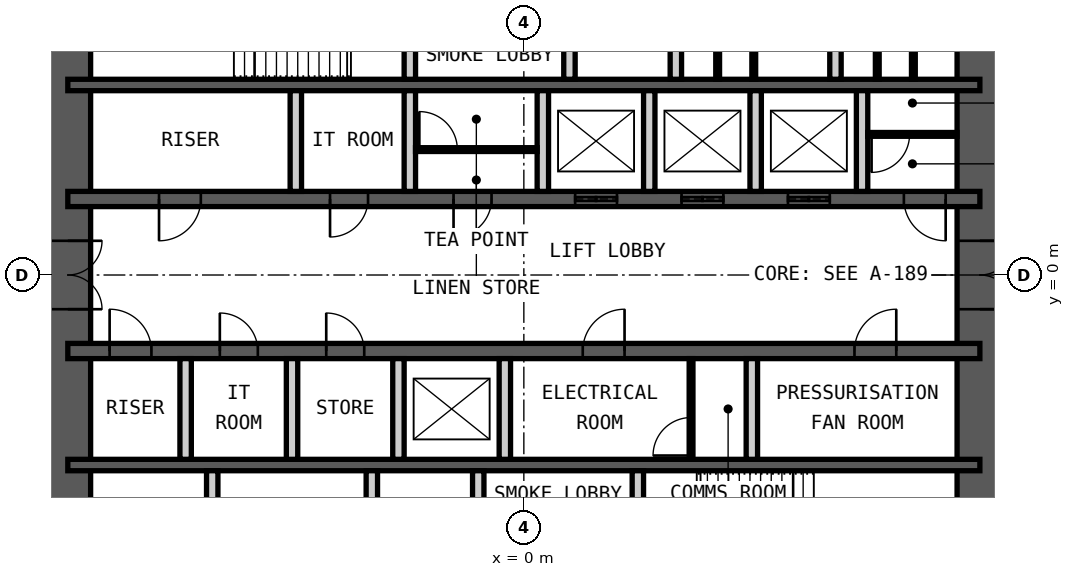
"""IFC4 building model, lengths in metres.
Left out: names, types, materials, properties, quantities, classifications, styles, units other than length and angle.
Written with IfcOpenShell. Run it as: python <this file> out.ifc"""

import sys

from ifc_helpers import new_model, si_unit, direction, frame, frame_2d, origin, place, context, subcontext, project, spatial, rectangle, extrude, element, fill, save


model = new_model("IFC4")
c1 = context("Model", 3, precision=1e-05, world=origin(), true_north=direction((0.0, 1.0)))
c2 = subcontext(c1, "Body", "Model", "MODEL_VIEW")
j1 = project(units=[si_unit("LENGTHUNIT", "METRE"), si_unit("PLANEANGLEUNIT", "RADIAN")], contexts=[c1])
p1 = place(None, origin())
s1 = spatial("IfcSite", under=j1, at=p1, CompositionType="ELEMENT")
p2 = place(p1, origin())
s2 = spatial("IfcBuilding", under=s1, at=p2, CompositionType="ELEMENT")
p3 = place(p2, frame((0.0, 0.0, 201.4)))
s3 = spatial("IfcBuildingStorey", under=s2, at=p3, CompositionType="ELEMENT", Elevation=201.4)
p4 = place(p3, frame((12.0, -9.0, 0.0), z_axis=(0.0, 0.0, 1.0), x_axis=(0.0, 1.0, 0.0)))
e1 = element("IfcWall", 1, at=p4, inside=s3, PredefinedType="SHEAR", context=c2, shape_type="SweptSolid", body=[
    extrude(rectangle(XDim=18.0, YDim=1.2, at=frame_2d((9.0, 0.0))), origin(), (0.0, 0.0, 1.0), 4.2),
])
p5 = place(p4, frame((8.1, 0.0, 0.0)))
e2 = element("IfcOpeningElement", 2, at=p5, cuts=e1, PredefinedType="OPENING", context=c2, shape_type="SweptSolid", body=[
    extrude(rectangle(XDim=1.8, YDim=2.1, at=frame_2d((0.9, 1.05))), frame((0.0, 0.61, 0.0), z_axis=(0.0, -1.0, 0.0), x_axis=(1.0, 0.0, 0.0)), (0.0, 0.0, 1.0), 1.22),
])
p6 = place(p3, frame((-12.0, -9.0, 0.0), z_axis=(0.0, 0.0, 1.0), x_axis=(0.0, 1.0, 0.0)))
e3 = element("IfcWall", 3, at=p6, inside=s3, PredefinedType="SHEAR", context=c2, shape_type="SweptSolid", body=[
    extrude(rectangle(XDim=18.0, YDim=1.2, at=frame_2d((9.0, 0.0))), origin(), (0.0, 0.0, 1.0), 4.2),
])
p7 = place(p6, frame((8.1, 0.0, 0.0)))
e4 = element("IfcOpeningElement", 4, at=p7, cuts=e3, PredefinedType="OPENING", context=c2, shape_type="SweptSolid", body=[
    extrude(rectangle(XDim=1.8, YDim=2.1, at=frame_2d((0.9, 1.05))), frame((0.0, 0.61, 0.0), z_axis=(0.0, -1.0, 0.0), x_axis=(1.0, 0.0, 0.0)), (0.0, 0.0, 1.0), 1.22),
])
p8 = place(p3, frame((-12.0, 5.0, 0.0), z_axis=(0.0, 0.0, 1.0), x_axis=(1.0, 0.0, 0.0)))
e5 = element("IfcWall", 5, at=p8, inside=s3, PredefinedType="SHEAR", context=c2, shape_type="SweptSolid", body=[
    extrude(rectangle(XDim=24.0, YDim=0.3, at=frame_2d((12.0, 0.0))), origin(), (0.0, 0.0, 1.0), 4.2),
])
p9 = place(p3, frame((-12.0, 2.0, 0.0), z_axis=(0.0, 0.0, 1.0), x_axis=(1.0, 0.0, 0.0)))
e6 = element("IfcWall", 6, at=p9, inside=s3, PredefinedType="SHEAR", context=c2, shape_type="SweptSolid", body=[
    extrude(rectangle(XDim=24.0, YDim=0.4, at=frame_2d((12.0, 0.0))), origin(), (0.0, 0.0, 1.0), 4.2),
])
p10 = place(p9, frame((2.4, 0.0, 0.0)))
e7 = element("IfcOpeningElement", 7, at=p10, cuts=e6, PredefinedType="OPENING", context=c2, shape_type="SweptSolid", body=[
    extrude(rectangle(XDim=1.1, YDim=2.1, at=frame_2d((0.55, 1.05))), frame((0.0, 0.21, 0.0), z_axis=(0.0, -1.0, 0.0), x_axis=(1.0, 0.0, 0.0)), (0.0, 0.0, 1.0), 0.42),
])
p11 = place(p9, frame((22.0, 0.0, 0.0)))
e8 = element("IfcOpeningElement", 8, at=p11, cuts=e6, PredefinedType="OPENING", context=c2, shape_type="SweptSolid", body=[
    extrude(rectangle(XDim=1.1, YDim=2.1, at=frame_2d((0.55, 1.05))), frame((0.0, 0.21, 0.0), z_axis=(0.0, -1.0, 0.0), x_axis=(1.0, 0.0, 0.0)), (0.0, 0.0, 1.0), 0.42),
])
p12 = place(p9, frame((10.15, 0.0, 0.0)))
e9 = element("IfcOpeningElement", 9, at=p12, cuts=e6, PredefinedType="OPENING", context=c2, shape_type="SweptSolid", body=[
    extrude(rectangle(XDim=1.0, YDim=2.1, at=frame_2d((0.5, 1.05))), frame((0.0, 0.21, 0.0), z_axis=(0.0, -1.0, 0.0), x_axis=(1.0, 0.0, 0.0)), (0.0, 0.0, 1.0), 0.42),
])
p13 = place(p9, frame((6.9, 0.0, 0.0)))
e10 = element("IfcOpeningElement", 10, at=p13, cuts=e6, PredefinedType="OPENING", context=c2, shape_type="SweptSolid", body=[
    extrude(rectangle(XDim=1.0, YDim=2.1, at=frame_2d((0.5, 1.05))), frame((0.0, 0.21, 0.0), z_axis=(0.0, -1.0, 0.0), x_axis=(1.0, 0.0, 0.0)), (0.0, 0.0, 1.0), 0.42),
])
p14 = place(p9, frame((13.35, 0.0, 0.0)))
e11 = element("IfcOpeningElement", 11, at=p14, cuts=e6, PredefinedType="OPENING", context=c2, shape_type="SweptSolid", body=[
    extrude(rectangle(XDim=1.1, YDim=2.4, at=frame_2d((0.55, 1.2))), frame((0.0, 0.21, 0.0), z_axis=(0.0, -1.0, 0.0), x_axis=(1.0, 0.0, 0.0)), (0.0, 0.0, 1.0), 0.42),
])
p15 = place(p9, frame((16.15, 0.0, 0.0)))
e12 = element("IfcOpeningElement", 12, at=p15, cuts=e6, PredefinedType="OPENING", context=c2, shape_type="SweptSolid", body=[
    extrude(rectangle(XDim=1.1, YDim=2.4, at=frame_2d((0.55, 1.2))), frame((0.0, 0.21, 0.0), z_axis=(0.0, -1.0, 0.0), x_axis=(1.0, 0.0, 0.0)), (0.0, 0.0, 1.0), 0.42),
])
p16 = place(p9, frame((18.95, 0.0, 0.0)))
e13 = element("IfcOpeningElement", 13, at=p16, cuts=e6, PredefinedType="OPENING", context=c2, shape_type="SweptSolid", body=[
    extrude(rectangle(XDim=1.1, YDim=2.4, at=frame_2d((0.55, 1.2))), frame((0.0, 0.21, 0.0), z_axis=(0.0, -1.0, 0.0), x_axis=(1.0, 0.0, 0.0)), (0.0, 0.0, 1.0), 0.42),
])
p17 = place(p3, frame((-12.0, -2.0, 0.0), z_axis=(0.0, 0.0, 1.0), x_axis=(1.0, 0.0, 0.0)))
e14 = element("IfcWall", 14, at=p17, inside=s3, PredefinedType="SHEAR", context=c2, shape_type="SweptSolid", body=[
    extrude(rectangle(XDim=24.0, YDim=0.4, at=frame_2d((12.0, 0.0))), origin(), (0.0, 0.0, 1.0), 4.2),
])
p18 = place(p17, frame((1.1, 0.0, 0.0)))
e15 = element("IfcOpeningElement", 15, at=p18, cuts=e14, PredefinedType="OPENING", context=c2, shape_type="SweptSolid", body=[
    extrude(rectangle(XDim=1.1, YDim=2.1, at=frame_2d((0.55, 1.05))), frame((0.0, 0.21, 0.0), z_axis=(0.0, -1.0, 0.0), x_axis=(1.0, 0.0, 0.0)), (0.0, 0.0, 1.0), 0.42),
])
p19 = place(p17, frame((13.55, 0.0, 0.0)))
e16 = element("IfcOpeningElement", 16, at=p19, cuts=e14, PredefinedType="OPENING", context=c2, shape_type="SweptSolid", body=[
    extrude(rectangle(XDim=1.1, YDim=2.1, at=frame_2d((0.55, 1.05))), frame((0.0, 0.21, 0.0), z_axis=(0.0, -1.0, 0.0), x_axis=(1.0, 0.0, 0.0)), (0.0, 0.0, 1.0), 0.42),
])
p20 = place(p17, frame((20.7, 0.0, 0.0)))
e17 = element("IfcOpeningElement", 17, at=p20, cuts=e14, PredefinedType="OPENING", context=c2, shape_type="SweptSolid", body=[
    extrude(rectangle(XDim=1.1, YDim=2.1, at=frame_2d((0.55, 1.05))), frame((0.0, 0.21, 0.0), z_axis=(0.0, -1.0, 0.0), x_axis=(1.0, 0.0, 0.0)), (0.0, 0.0, 1.0), 0.42),
])
p21 = place(p17, frame((4.0, 0.0, 0.0)))
e18 = element("IfcOpeningElement", 18, at=p21, cuts=e14, PredefinedType="OPENING", context=c2, shape_type="SweptSolid", body=[
    extrude(rectangle(XDim=1.0, YDim=2.1, at=frame_2d((0.5, 1.05))), frame((0.0, 0.21, 0.0), z_axis=(0.0, -1.0, 0.0), x_axis=(1.0, 0.0, 0.0)), (0.0, 0.0, 1.0), 0.42),
])
p22 = place(p17, frame((6.8, 0.0, 0.0)))
e19 = element("IfcOpeningElement", 19, at=p22, cuts=e14, PredefinedType="OPENING", context=c2, shape_type="SweptSolid", body=[
    extrude(rectangle(XDim=1.0, YDim=2.1, at=frame_2d((0.5, 1.05))), frame((0.0, 0.21, 0.0), z_axis=(0.0, -1.0, 0.0), x_axis=(1.0, 0.0, 0.0)), (0.0, 0.0, 1.0), 0.42),
])
p23 = place(p3, frame((-12.0, -5.0, 0.0), z_axis=(0.0, 0.0, 1.0), x_axis=(1.0, 0.0, 0.0)))
e20 = element("IfcWall", 20, at=p23, inside=s3, PredefinedType="SHEAR", context=c2, shape_type="SweptSolid", body=[
    extrude(rectangle(XDim=24.0, YDim=0.3, at=frame_2d((12.0, 0.0))), origin(), (0.0, 0.0, 1.0), 4.2),
])
p24 = place(p3, frame((-3.0, 5.15, 0.0), z_axis=(0.0, 0.0, 1.0), x_axis=(0.0, 1.0, 0.0)))
e21 = element("IfcWall", 21, at=p24, inside=s3, PredefinedType="PARTITIONING", context=c2, shape_type="SweptSolid", body=[
    extrude(rectangle(XDim=3.85, YDim=0.3, at=frame_2d((1.925, 0.0))), origin(), (0.0, 0.0, 1.0), 3.98),
])
p25 = place(p24, frame((1.425, 0.0, 0.0)))
e22 = element("IfcOpeningElement", 22, at=p25, cuts=e21, PredefinedType="OPENING", context=c2, shape_type="SweptSolid", body=[
    extrude(rectangle(XDim=1.0, YDim=2.1, at=frame_2d((0.5, 1.05))), frame((0.0, 0.16, 0.0), z_axis=(0.0, -1.0, 0.0), x_axis=(1.0, 0.0, 0.0)), (0.0, 0.0, 1.0), 0.32),
])
p26 = place(p3, frame((1.2, 5.15, 0.0), z_axis=(0.0, 0.0, 1.0), x_axis=(0.0, 1.0, 0.0)))
e23 = element("IfcWall", 23, at=p26, inside=s3, PredefinedType="PARTITIONING", context=c2, shape_type="SweptSolid", body=[
    extrude(rectangle(XDim=3.85, YDim=0.3, at=frame_2d((1.925, 0.0))), origin(), (0.0, 0.0, 1.0), 3.98),
])
p27 = place(p26, frame((1.375, 0.0, 0.0)))
e24 = element("IfcOpeningElement", 24, at=p27, cuts=e23, PredefinedType="OPENING", context=c2, shape_type="SweptSolid", body=[
    extrude(rectangle(XDim=1.1, YDim=2.4, at=frame_2d((0.55, 1.2))), frame((0.0, 0.16, 0.0), z_axis=(0.0, -1.0, 0.0), x_axis=(1.0, 0.0, 0.0)), (0.0, 0.0, 1.0), 0.32),
])
for number, where, z_axis, x_axis in (
    (25, (4.0, 5.15, 0.0), (0.0, 0.0, 1.0), (0.0, 1.0, 0.0)),
    (26, (8.2, 5.15, 0.0), (0.0, 0.0, 1.0), (0.0, 1.0, 0.0)),
):
    element("IfcWall", number, at=place(p3, frame(where, z_axis=z_axis, x_axis=x_axis)), inside=s3, PredefinedType="PARTITIONING", context=c2, shape_type="SweptSolid", body=[
        extrude(rectangle(XDim=3.85, YDim=0.3, at=frame_2d((1.925, 0.0))), origin(), (0.0, 0.0, 1.0), 3.98),
    ])
for number, where, z_axis, x_axis in (
    (27, (-6.0, 2.2, 0.0), (0.0, 0.0, 1.0), (0.0, 1.0, 0.0)),
    (28, (-3.0, 2.2, 0.0), (0.0, 0.0, 1.0), (0.0, 1.0, 0.0)),
    (29, (0.5, 2.2, 0.0), (0.0, 0.0, 1.0), (0.0, 1.0, 0.0)),
    (30, (3.3, 2.2, 0.0), (0.0, 0.0, 1.0), (0.0, 1.0, 0.0)),
    (31, (6.1, 2.2, 0.0), (0.0, 0.0, 1.0), (0.0, 1.0, 0.0)),
    (32, (8.9, 2.2, 0.0), (0.0, 0.0, 1.0), (0.0, 1.0, 0.0)),
    (33, (-8.9, -4.85, 0.0), (0.0, 0.0, 1.0), (0.0, 1.0, 0.0)),
    (34, (-6.1, -4.85, 0.0), (0.0, 0.0, 1.0), (0.0, 1.0, 0.0)),
    (35, (-3.3, -4.85, 0.0), (0.0, 0.0, 1.0), (0.0, 1.0, 0.0)),
    (36, (-0.5, -4.85, 0.0), (0.0, 0.0, 1.0), (0.0, 1.0, 0.0)),
    (37, (6.0, -4.85, 0.0), (0.0, 0.0, 1.0), (0.0, 1.0, 0.0)),
):
    element("IfcWall", number, at=place(p3, frame(where, z_axis=z_axis, x_axis=x_axis)), inside=s3, PredefinedType="PARTITIONING", context=c2, shape_type="SweptSolid", body=[
        extrude(rectangle(XDim=2.65, YDim=0.3, at=frame_2d((1.325, 0.0))), origin(), (0.0, 0.0, 1.0), 3.98),
    ])
for number, where, z_axis, x_axis in (
    (38, (-8.2, -9.0, 0.0), (0.0, 0.0, 1.0), (0.0, 1.0, 0.0)),
    (39, (-4.0, -9.0, 0.0), (0.0, 0.0, 1.0), (0.0, 1.0, 0.0)),
):
    element("IfcWall", number, at=place(p3, frame(where, z_axis=z_axis, x_axis=x_axis)), inside=s3, PredefinedType="PARTITIONING", context=c2, shape_type="SweptSolid", body=[
        extrude(rectangle(XDim=3.85, YDim=0.3, at=frame_2d((1.925, 0.0))), origin(), (0.0, 0.0, 1.0), 3.98),
    ])
p28 = place(p3, frame((-1.2, -9.0, 0.0), z_axis=(0.0, 0.0, 1.0), x_axis=(0.0, 1.0, 0.0)))
e40 = element("IfcWall", 40, at=p28, inside=s3, PredefinedType="PARTITIONING", context=c2, shape_type="SweptSolid", body=[
    extrude(rectangle(XDim=3.85, YDim=0.3, at=frame_2d((1.925, 0.0))), origin(), (0.0, 0.0, 1.0), 3.98),
])
p29 = place(p28, frame((1.375, 0.0, 0.0)))
e41 = element("IfcOpeningElement", 41, at=p29, cuts=e40, PredefinedType="OPENING", context=c2, shape_type="SweptSolid", body=[
    extrude(rectangle(XDim=1.1, YDim=2.4, at=frame_2d((0.55, 1.2))), frame((0.0, 0.16, 0.0), z_axis=(0.0, -1.0, 0.0), x_axis=(1.0, 0.0, 0.0)), (0.0, 0.0, 1.0), 0.32),
])
p30 = place(p3, frame((3.0, -9.0, 0.0), z_axis=(0.0, 0.0, 1.0), x_axis=(0.0, 1.0, 0.0)))
e42 = element("IfcWall", 42, at=p30, inside=s3, PredefinedType="PARTITIONING", context=c2, shape_type="SweptSolid", body=[
    extrude(rectangle(XDim=3.85, YDim=0.3, at=frame_2d((1.925, 0.0))), origin(), (0.0, 0.0, 1.0), 3.98),
])
p31 = place(p30, frame((1.425, 0.0, 0.0)))
e43 = element("IfcOpeningElement", 43, at=p31, cuts=e42, PredefinedType="OPENING", context=c2, shape_type="SweptSolid", body=[
    extrude(rectangle(XDim=1.0, YDim=2.1, at=frame_2d((0.5, 1.05))), frame((0.0, 0.16, 0.0), z_axis=(0.0, -1.0, 0.0), x_axis=(1.0, 0.0, 0.0)), (0.0, 0.0, 1.0), 0.32),
])
p32 = place(p3, frame((-2.85, 3.3, 0.0), z_axis=(0.0, 0.0, 1.0), x_axis=(1.0, 0.0, 0.0)))
e44 = element("IfcWall", 44, at=p32, inside=s3, PredefinedType="PARTITIONING", context=c2, shape_type="SweptSolid", body=[
    extrude(rectangle(XDim=3.2, YDim=0.1, at=frame_2d((1.6, 0.0))), origin(), (0.0, 0.0, 1.0), 3.98),
])
p33 = place(p32, frame((0.1, 0.0, 0.0)))
e45 = element("IfcOpeningElement", 45, at=p33, cuts=e44, PredefinedType="OPENING", context=c2, shape_type="SweptSolid", body=[
    extrude(rectangle(XDim=1.0, YDim=2.4, at=frame_2d((0.5, 1.2))), frame((0.0, 0.06, 0.0), z_axis=(0.0, -1.0, 0.0), x_axis=(1.0, 0.0, 0.0)), (0.0, 0.0, 1.0), 0.12),
])
p34 = place(p3, frame((4.4, -4.85, 0.0), z_axis=(0.0, 0.0, 1.0), x_axis=(0.0, 1.0, 0.0)))
e46 = element("IfcWall", 46, at=p34, inside=s3, PredefinedType="PARTITIONING", context=c2, shape_type="SweptSolid", body=[
    extrude(rectangle(XDim=2.65, YDim=0.1, at=frame_2d((1.325, 0.0))), origin(), (0.0, 0.0, 1.0), 3.98),
])
p35 = place(p34, frame((0.1, 0.0, 0.0)))
e47 = element("IfcOpeningElement", 47, at=p35, cuts=e46, PredefinedType="OPENING", context=c2, shape_type="SweptSolid", body=[
    extrude(rectangle(XDim=1.0, YDim=2.4, at=frame_2d((0.5, 1.2))), frame((0.0, 0.06, 0.0), z_axis=(0.0, -1.0, 0.0), x_axis=(1.0, 0.0, 0.0)), (0.0, 0.0, 1.0), 0.12),
])
p36 = place(p3, frame((9.05, 3.7, 0.0), z_axis=(0.0, 0.0, 1.0), x_axis=(1.0, 0.0, 0.0)))
e48 = element("IfcWall", 48, at=p36, inside=s3, PredefinedType="PARTITIONING", context=c2, shape_type="SweptSolid", body=[
    extrude(rectangle(XDim=2.35, YDim=0.1, at=frame_2d((1.175, 0.0))), origin(), (0.0, 0.0, 1.0), 3.98),
])
p37 = place(p36, frame((0.1, 0.0, 0.0)))
e49 = element("IfcOpeningElement", 49, at=p37, cuts=e48, PredefinedType="OPENING", context=c2, shape_type="SweptSolid", body=[
    extrude(rectangle(XDim=1.0, YDim=2.4, at=frame_2d((0.5, 1.2))), frame((0.0, 0.06, 0.0), z_axis=(0.0, -1.0, 0.0), x_axis=(1.0, 0.0, 0.0)), (0.0, 0.0, 1.0), 0.12),
])
for number, where, z_axis, x_axis in (
    (50, (5.1, 5.15, 0.0), (0.0, 0.0, 1.0), (0.0, 1.0, 0.0)),
    (51, (6.05, 5.15, 0.0), (0.0, 0.0, 1.0), (0.0, 1.0, 0.0)),
    (52, (9.3, 5.15, 0.0), (0.0, 0.0, 1.0), (0.0, 1.0, 0.0)),
    (53, (10.25, 5.15, 0.0), (0.0, 0.0, 1.0), (0.0, 1.0, 0.0)),
):
    element("IfcWall", number, at=place(p3, frame(where, z_axis=z_axis, x_axis=x_axis)), inside=s3, PredefinedType="PARTITIONING", context=c2, shape_type="SweptSolid", body=[
        extrude(rectangle(XDim=1.5, YDim=0.1, at=frame_2d((0.75, 0.0))), origin(), (0.0, 0.0, 1.0), 2.1),
    ])
p38 = place(p10, origin())
e54 = element("IfcDoor", 54, at=p38, inside=s3, OperationType="SINGLE_SWING_LEFT", PredefinedType="DOOR", context=c2, shape_type="SweptSolid", body=[
    extrude(rectangle(XDim=1.1, YDim=2.1, at=frame_2d((0.55, 1.05))), frame((0.0, 0.025, 0.0), z_axis=(0.0, -1.0, 0.0), x_axis=(1.0, 0.0, 0.0)), (0.0, 0.0, 1.0), 0.05),
])
fill(e7, e54)
p39 = place(p18, origin())
e55 = element("IfcDoor", 55, at=p39, inside=s3, OperationType="SINGLE_SWING_RIGHT", PredefinedType="DOOR", context=c2, shape_type="SweptSolid", body=[
    extrude(rectangle(XDim=1.1, YDim=2.1, at=frame_2d((0.55, 1.05))), frame((0.0, 0.025, 0.0), z_axis=(0.0, -1.0, 0.0), x_axis=(1.0, 0.0, 0.0)), (0.0, 0.0, 1.0), 0.05),
])
fill(e15, e55)
p40 = place(p11, origin())
e56 = element("IfcDoor", 56, at=p40, inside=s3, OperationType="SINGLE_SWING_RIGHT", PredefinedType="DOOR", context=c2, shape_type="SweptSolid", body=[
    extrude(rectangle(XDim=1.1, YDim=2.1, at=frame_2d((0.55, 1.05))), frame((0.0, 0.025, 0.0), z_axis=(0.0, -1.0, 0.0), x_axis=(1.0, 0.0, 0.0)), (0.0, 0.0, 1.0), 0.05),
])
fill(e8, e56)
p41 = place(p12, origin())
e57 = element("IfcDoor", 57, at=p41, inside=s3, OperationType="SINGLE_SWING_LEFT", PredefinedType="DOOR", context=c2, shape_type="SweptSolid", body=[
    extrude(rectangle(XDim=1.0, YDim=2.1, at=frame_2d((0.5, 1.05))), frame((0.0, 0.025, 0.0), z_axis=(0.0, -1.0, 0.0), x_axis=(1.0, 0.0, 0.0)), (0.0, 0.0, 1.0), 0.05),
])
fill(e9, e57)
p42 = place(p19, origin())
e58 = element("IfcDoor", 58, at=p42, inside=s3, OperationType="SINGLE_SWING_LEFT", PredefinedType="DOOR", context=c2, shape_type="SweptSolid", body=[
    extrude(rectangle(XDim=1.1, YDim=2.1, at=frame_2d((0.55, 1.05))), frame((0.0, 0.025, 0.0), z_axis=(0.0, -1.0, 0.0), x_axis=(1.0, 0.0, 0.0)), (0.0, 0.0, 1.0), 0.05),
])
fill(e16, e58)
p43 = place(p20, origin())
e59 = element("IfcDoor", 59, at=p43, inside=s3, OperationType="SINGLE_SWING_LEFT", PredefinedType="DOOR", context=c2, shape_type="SweptSolid", body=[
    extrude(rectangle(XDim=1.1, YDim=2.1, at=frame_2d((0.55, 1.05))), frame((0.0, 0.025, 0.0), z_axis=(0.0, -1.0, 0.0), x_axis=(1.0, 0.0, 0.0)), (0.0, 0.0, 1.0), 0.05),
])
fill(e17, e59)
p44 = place(p5, origin())
e60 = element("IfcDoor", 60, at=p44, inside=s3, OperationType="DOUBLE_DOOR_DOUBLE_SWING", PredefinedType="DOOR", context=c2, shape_type="SweptSolid", body=[
    extrude(rectangle(XDim=1.8, YDim=2.1, at=frame_2d((0.9, 1.05))), frame((0.0, 0.025, 0.0), z_axis=(0.0, -1.0, 0.0), x_axis=(1.0, 0.0, 0.0)), (0.0, 0.0, 1.0), 0.05),
])
fill(e2, e60)
p45 = place(p7, origin())
e61 = element("IfcDoor", 61, at=p45, inside=s3, OperationType="DOUBLE_DOOR_DOUBLE_SWING", PredefinedType="DOOR", context=c2, shape_type="SweptSolid", body=[
    extrude(rectangle(XDim=1.8, YDim=2.1, at=frame_2d((0.9, 1.05))), frame((0.0, 0.025, 0.0), z_axis=(0.0, -1.0, 0.0), x_axis=(1.0, 0.0, 0.0)), (0.0, 0.0, 1.0), 0.05),
])
fill(e4, e61)
p46 = place(p13, origin())
e62 = element("IfcDoor", 62, at=p46, inside=s3, OperationType="SINGLE_SWING_LEFT", PredefinedType="DOOR", context=c2, shape_type="SweptSolid", body=[
    extrude(rectangle(XDim=1.0, YDim=2.1, at=frame_2d((0.5, 1.05))), frame((0.0, 0.025, 0.0), z_axis=(0.0, -1.0, 0.0), x_axis=(1.0, 0.0, 0.0)), (0.0, 0.0, 1.0), 0.05),
])
fill(e10, e62)
p47 = place(p14, origin())
e63 = element("IfcDoor", 63, at=p47, inside=s3, OperationType="DOUBLE_DOOR_SLIDING", PredefinedType="DOOR", context=c2, shape_type="SweptSolid", body=[
    extrude(rectangle(XDim=1.1, YDim=2.4, at=frame_2d((0.55, 1.2))), frame((0.0, 0.025, 0.0), z_axis=(0.0, -1.0, 0.0), x_axis=(1.0, 0.0, 0.0)), (0.0, 0.0, 1.0), 0.05),
])
fill(e11, e63)
p48 = place(p15, origin())
e64 = element("IfcDoor", 64, at=p48, inside=s3, OperationType="DOUBLE_DOOR_SLIDING", PredefinedType="DOOR", context=c2, shape_type="SweptSolid", body=[
    extrude(rectangle(XDim=1.1, YDim=2.4, at=frame_2d((0.55, 1.2))), frame((0.0, 0.025, 0.0), z_axis=(0.0, -1.0, 0.0), x_axis=(1.0, 0.0, 0.0)), (0.0, 0.0, 1.0), 0.05),
])
fill(e12, e64)
p49 = place(p16, origin())
e65 = element("IfcDoor", 65, at=p49, inside=s3, OperationType="DOUBLE_DOOR_SLIDING", PredefinedType="DOOR", context=c2, shape_type="SweptSolid", body=[
    extrude(rectangle(XDim=1.1, YDim=2.4, at=frame_2d((0.55, 1.2))), frame((0.0, 0.025, 0.0), z_axis=(0.0, -1.0, 0.0), x_axis=(1.0, 0.0, 0.0)), (0.0, 0.0, 1.0), 0.05),
])
fill(e13, e65)
p50 = place(p21, origin())
e66 = element("IfcDoor", 66, at=p50, inside=s3, OperationType="SINGLE_SWING_RIGHT", PredefinedType="DOOR", context=c2, shape_type="SweptSolid", body=[
    extrude(rectangle(XDim=1.0, YDim=2.1, at=frame_2d((0.5, 1.05))), frame((0.0, 0.025, 0.0), z_axis=(0.0, -1.0, 0.0), x_axis=(1.0, 0.0, 0.0)), (0.0, 0.0, 1.0), 0.05),
])
fill(e18, e66)
p51 = place(p22, origin())
e67 = element("IfcDoor", 67, at=p51, inside=s3, OperationType="SINGLE_SWING_RIGHT", PredefinedType="DOOR", context=c2, shape_type="SweptSolid", body=[
    extrude(rectangle(XDim=1.0, YDim=2.1, at=frame_2d((0.5, 1.05))), frame((0.0, 0.025, 0.0), z_axis=(0.0, -1.0, 0.0), x_axis=(1.0, 0.0, 0.0)), (0.0, 0.0, 1.0), 0.05),
])
fill(e19, e67)
p52 = place(p33, origin())
e68 = element("IfcDoor", 68, at=p52, inside=s3, OperationType="SINGLE_SWING_RIGHT", PredefinedType="DOOR", context=c2, shape_type="SweptSolid", body=[
    extrude(rectangle(XDim=1.0, YDim=2.4, at=frame_2d((0.5, 1.2))), frame((0.0, 0.025, 0.0), z_axis=(0.0, -1.0, 0.0), x_axis=(1.0, 0.0, 0.0)), (0.0, 0.0, 1.0), 0.05),
])
fill(e45, e68)
p53 = place(p35, origin())
e69 = element("IfcDoor", 69, at=p53, inside=s3, OperationType="SINGLE_SWING_RIGHT", PredefinedType="DOOR", context=c2, shape_type="SweptSolid", body=[
    extrude(rectangle(XDim=1.0, YDim=2.4, at=frame_2d((0.5, 1.2))), frame((0.0, 0.025, 0.0), z_axis=(0.0, -1.0, 0.0), x_axis=(1.0, 0.0, 0.0)), (0.0, 0.0, 1.0), 0.05),
])
fill(e47, e69)
p54 = place(p37, origin())
e70 = element("IfcDoor", 70, at=p54, inside=s3, OperationType="SINGLE_SWING_LEFT", PredefinedType="DOOR", context=c2, shape_type="SweptSolid", body=[
    extrude(rectangle(XDim=1.0, YDim=2.4, at=frame_2d((0.5, 1.2))), frame((0.0, 0.025, 0.0), z_axis=(0.0, -1.0, 0.0), x_axis=(1.0, 0.0, 0.0)), (0.0, 0.0, 1.0), 0.05),
])
fill(e49, e70)
save(model, sys.argv[1])
